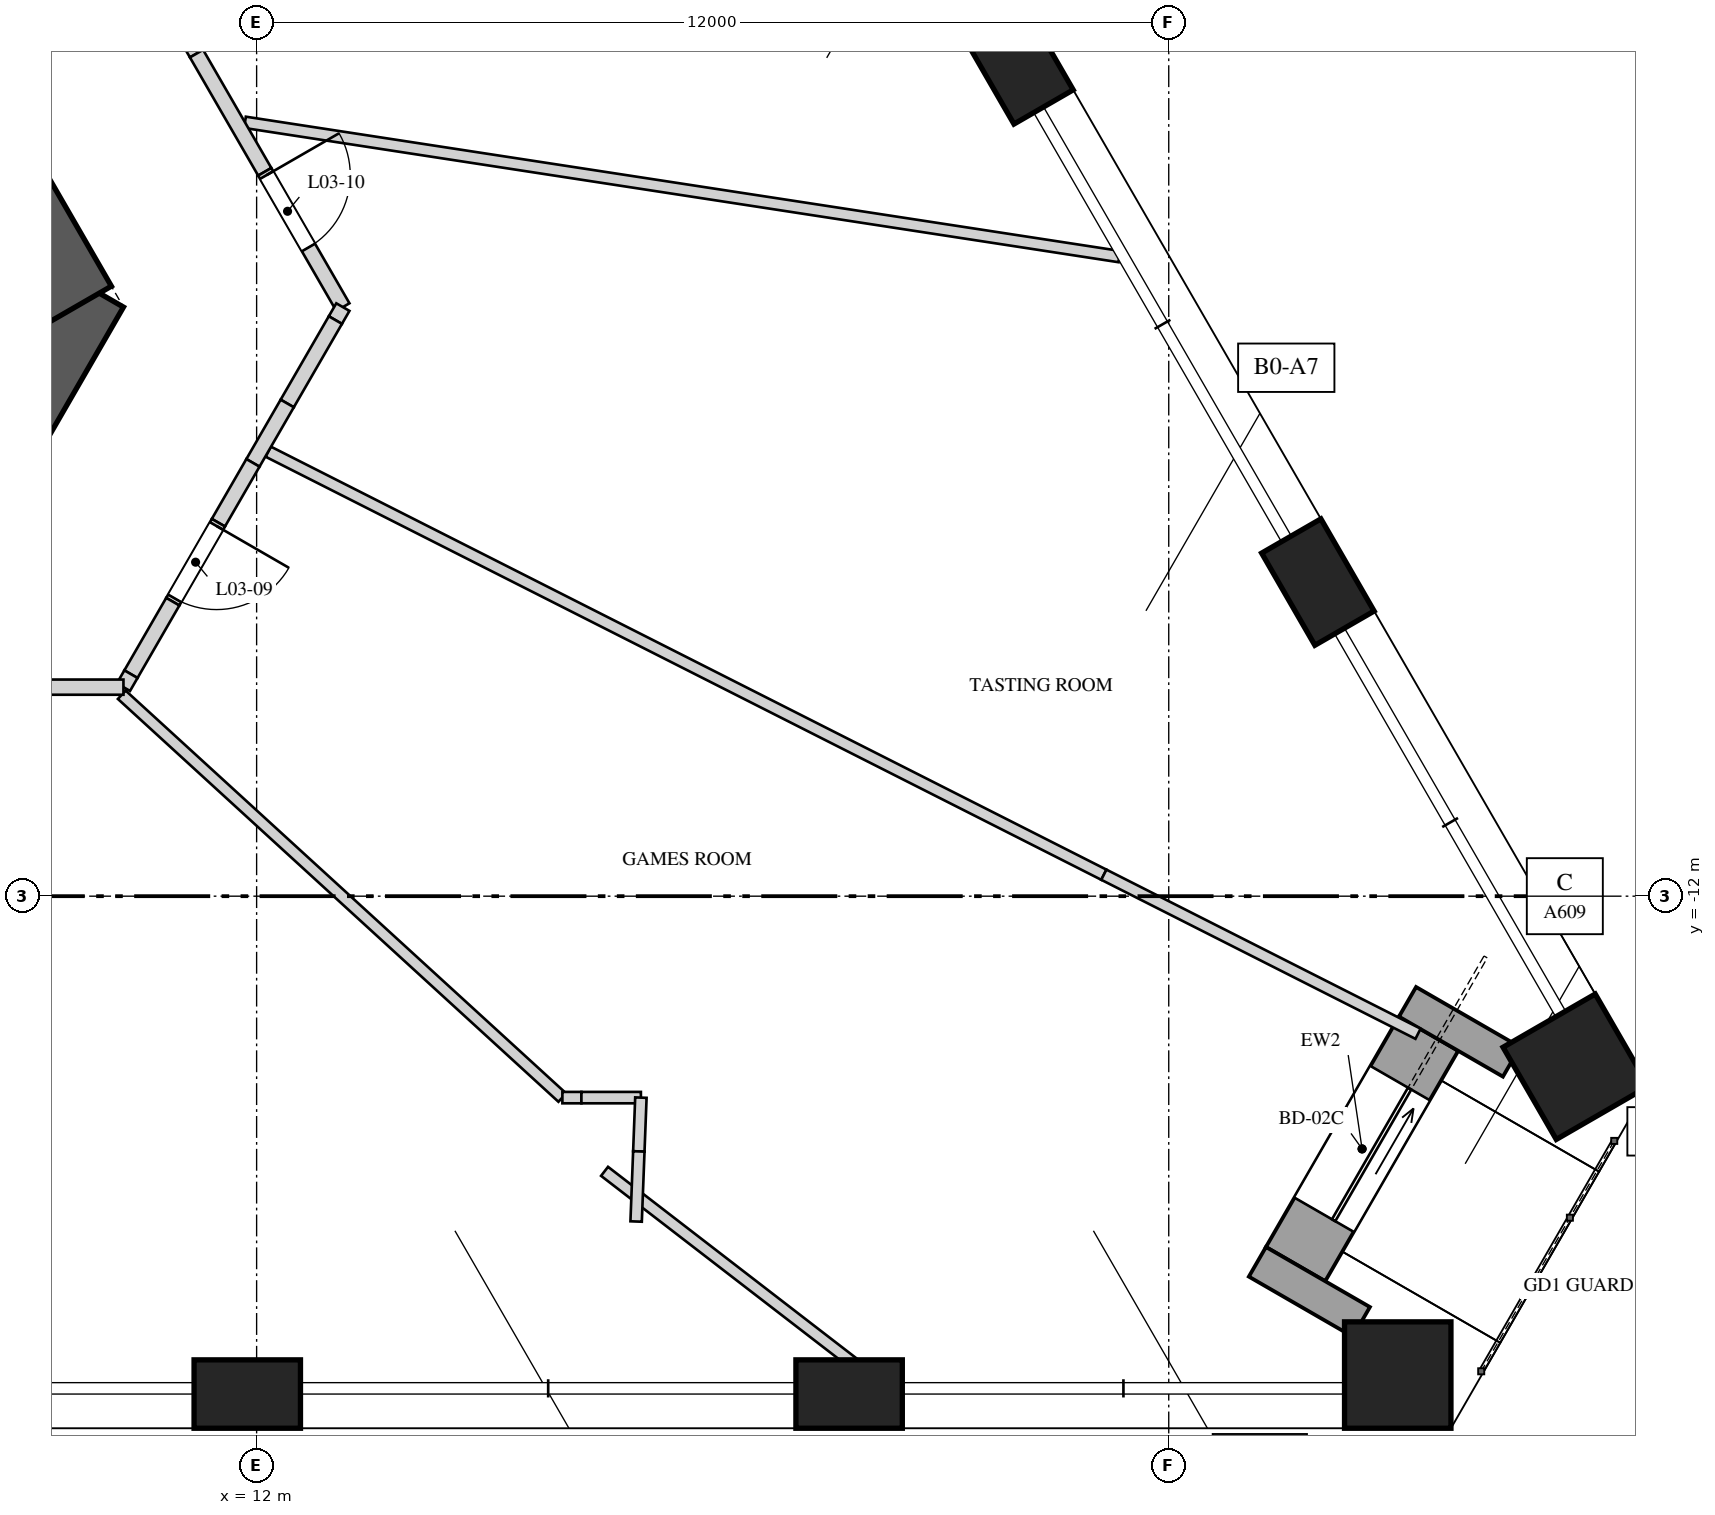
"""IFC4 building model, lengths in metres.
Left out: names, types, materials, properties, quantities, classifications, styles, units other than length and angle.
Written with IfcOpenShell. Run it as: python <this file> out.ifc"""

import sys

from ifc_helpers import new_model, si_unit, direction, frame, frame_2d, origin, origin_2d, place, context, subcontext, project, spatial, polyline, rectangle, outline, extrude, element, fill, save


model = new_model("IFC4")
c1 = context("Model", 3, precision=1e-05, world=origin(), true_north=direction((0.0, 1.0)))
c2 = subcontext(c1, "Body", "Model", "MODEL_VIEW")
j1 = project(units=[si_unit("LENGTHUNIT", "METRE"), si_unit("PLANEANGLEUNIT", "RADIAN")], contexts=[c1])
p1 = place(None, origin())
s1 = spatial("IfcSite", under=j1, at=p1, CompositionType="ELEMENT")
p2 = place(p1, origin())
s2 = spatial("IfcBuilding", under=s1, at=p2, CompositionType="ELEMENT")
p3 = place(p2, frame((0.0, 0.0, 20.0)))
s3 = spatial("IfcBuildingStorey", under=s2, at=p3, CompositionType="ELEMENT", Elevation=20.0)
p4 = place(p3, frame((8.328, -6.475, 0.0), z_axis=(0.0, 0.0, 1.0), x_axis=(0.499995765644, 0.866027848477, 0.0)))
e1 = element("IfcWall", 1, at=p4, inside=s3, PredefinedType="SHEAR", context=c2, shape_type="SweptSolid", body=[
    extrude(rectangle(XDim=2.887, YDim=1.1, at=frame_2d((1.443, 0.0))), origin(), (0.0, 0.0, 1.0), 5.0),
])
p5 = place(p3, frame((9.613, -4.25, 0.0), z_axis=(0.0, 0.0, 1.0), x_axis=(-0.500001757713, 0.866024388966, 0.0)))
e2 = element("IfcWall", 2, at=p5, inside=s3, PredefinedType="SHEAR", context=c2, shape_type="SweptSolid", body=[
    extrude(rectangle(XDim=16.974, YDim=1.1, at=frame_2d((8.487, 0.0))), origin(), (0.0, 0.0, 1.0), 5.0),
])
p6 = place(p5, frame((6.762, 0.0, 0.0)))
e3 = element("IfcOpeningElement", 3, at=p6, cuts=e2, PredefinedType="OPENING", context=c2, shape_type="SweptSolid", body=[
    extrude(rectangle(XDim=1.0, YDim=2.4, at=frame_2d((0.5, 1.2))), frame((0.0, 0.56, 0.0), z_axis=(0.0, -1.0, 0.0), x_axis=(1.0, 0.0, 0.0)), (0.0, 0.0, 1.0), 1.12),
])
for number, where, z_axis, x_axis in (
    (4, (11.877, -18.55, 0.0), (0.0, 0.0, 1.0), (1.0, 0.0, 0.0)),
    (5, (19.795, -18.55, 0.0), (0.0, 0.0, 1.0), (1.0, 0.0, 0.0)),
):
    element("IfcColumn", number, at=place(p3, frame(where, z_axis=z_axis, x_axis=x_axis)), inside=s3, PredefinedType="COLUMN", context=c2, shape_type="SweptSolid", body=[
        extrude(rectangle(XDim=1.4, YDim=0.9, at=origin_2d()), origin(), (0.0, 0.0, 1.0), 5.0),
    ])
for number, where, z_axis, x_axis in (
    (6, (27.013, -18.3, 0.0), (0.0, 0.0, 1.0), (1.0, 0.0, 0.0)),
    (7, (29.355, -14.244, 0.0), (0.0, 0.0, 1.0), (-0.5, 0.866, 0.0)),
):
    element("IfcColumn", number, at=place(p3, frame(where, z_axis=z_axis, x_axis=x_axis)), inside=s3, PredefinedType="COLUMN", context=c2, shape_type="SweptSolid", body=[
        extrude(rectangle(XDim=1.4, YDim=1.4, at=origin_2d()), origin(), (0.0, 0.0, 1.0), 5.0),
    ])
for number, where, z_axis, x_axis in (
    (8, (25.962, -7.868, 0.0), (0.0, 0.0, 1.0), (-0.5, 0.866, 0.0)),
    (9, (22.003, -1.011, 0.0), (0.0, 0.0, 1.0), (-0.5, 0.866, 0.0)),
):
    element("IfcColumn", number, at=place(p3, frame(where, z_axis=z_axis, x_axis=x_axis)), inside=s3, PredefinedType="COLUMN", context=c2, shape_type="SweptSolid", body=[
        extrude(rectangle(XDim=1.4, YDim=0.9, at=origin_2d()), origin(), (0.0, 0.0, 1.0), 5.0),
    ])
p7 = place(p3, frame((27.419, -13.81, 0.0), z_axis=(0.0, 0.0, 1.0), x_axis=(-0.500010275428, -0.866019471182, 0.0)))
e10 = element("IfcWall", 10, at=p7, inside=s3, PredefinedType="SOLIDWALL", context=c2, shape_type="SweptSolid", body=[
    extrude(rectangle(XDim=3.5, YDim=0.9, at=frame_2d((1.75, 0.0))), origin(), (0.0, 0.0, 1.0), 4.3),
])
p8 = place(p7, frame((0.75, 0.0, 0.0)))
e11 = element("IfcOpeningElement", 11, at=p8, cuts=e10, PredefinedType="OPENING", context=c2, shape_type="SweptSolid", body=[
    extrude(rectangle(XDim=2.0, YDim=2.4, at=frame_2d((1.0, 1.2))), frame((0.0, 0.46, 0.0), z_axis=(0.0, -1.0, 0.0), x_axis=(1.0, 0.0, 0.0)), (0.0, 0.0, 1.0), 0.92),
])
p9 = place(p3, frame((28.509, -14.179, 0.0), z_axis=(0.0, 0.0, 1.0), x_axis=(-0.866046570609, 0.499963336192, 0.0)))
e12 = element("IfcWall", 12, at=p9, inside=s3, PredefinedType="SOLIDWALL", context=c2, shape_type="SweptSolid", body=[
    extrude(rectangle(XDim=1.579, YDim=0.45, at=frame_2d((0.79, 0.0))), origin(), (0.0, 0.0, 1.0), 2.55),
])
p10 = place(p3, frame((26.534, -17.6, 0.0), z_axis=(0.0, 0.0, 1.0), x_axis=(-0.86597962928, 0.500079275387, 0.0)))
e13 = element("IfcWall", 13, at=p10, inside=s3, PredefinedType="SOLIDWALL", context=c2, shape_type="SweptSolid", body=[
    extrude(rectangle(XDim=1.579, YDim=0.45, at=frame_2d((0.79, 0.0))), origin(), (0.0, 0.0, 1.0), 2.55),
])
p11 = place(p3, frame((10.226, -9.35, 0.0), z_axis=(0.0, 0.0, 1.0), x_axis=(0.738001386372, -0.674799195104, 0.0)))
e14 = element("IfcWall", 14, at=p11, inside=s3, PredefinedType="PARTITIONING", context=c2, shape_type="SweptSolid", body=[
    extrude(rectangle(XDim=7.853, YDim=0.15, at=frame_2d((3.927, 0.0))), origin(), (0.0, 0.0, 1.0), 3.55),
])
p12 = place(p3, frame((11.847, -1.819, 0.0), z_axis=(0.0, 0.0, 1.0), x_axis=(0.988414820691, -0.151776619539, 0.0)))
e15 = element("IfcWall", 15, at=p12, inside=s3, PredefinedType="PARTITIONING", context=c2, shape_type="SweptSolid", body=[
    extrude(rectangle(XDim=11.639, YDim=0.15, at=frame_2d((5.82, 0.0))), origin(), (0.0, 0.0, 1.0), 4.65),
])
p13 = place(p3, frame((12.152, -6.152, 0.0), z_axis=(0.0, 0.0, 1.0), x_axis=(0.892189195248, -0.451661864542, 0.0)))
e16 = element("IfcWall", 16, at=p13, inside=s3, PredefinedType="PARTITIONING", context=c2, shape_type="SweptSolid", body=[
    extrude(rectangle(XDim=12.323, YDim=0.15, at=frame_2d((6.161, 0.0))), origin(), (0.0, 0.0, 1.0), 3.55),
])
p14 = place(p3, frame((23.146, -11.718, 0.0), z_axis=(0.0, 0.0, 1.0), x_axis=(0.892192371096, -0.451655591085, 0.0)))
e17 = element("IfcWall", 17, at=p14, inside=s3, PredefinedType="PARTITIONING", context=c2, shape_type="SweptSolid", body=[
    extrude(rectangle(XDim=4.633, YDim=0.15, at=frame_2d((2.316, 0.0))), origin(), (0.0, 0.0, 1.0), 4.65),
])
p15 = place(p3, frame((16.023, -14.65, 0.0), z_axis=(0.0, 0.0, 1.0), x_axis=(1.0, 0.0, 0.0)))
e18 = element("IfcWall", 18, at=p15, inside=s3, PredefinedType="PARTITIONING", context=c2, shape_type="SweptSolid", body=[
    extrude(rectangle(XDim=0.25, YDim=0.15, at=frame_2d((0.125, 0.0))), origin(), (0.0, 0.0, 1.0), 3.55),
])
p16 = place(p3, frame((16.273, -14.65, 0.0), z_axis=(0.0, 0.0, 1.0), x_axis=(1.0, 0.0, 0.0)))
e19 = element("IfcWall", 19, at=p16, inside=s3, PredefinedType="PARTITIONING", context=c2, shape_type="SweptSolid", body=[
    extrude(rectangle(XDim=0.782, YDim=0.15, at=frame_2d((0.391, 0.0))), origin(), (0.0, 0.0, 1.0), 4.65),
])
p17 = place(p3, frame((16.577, -15.62, 0.0), z_axis=(0.0, 0.0, 1.0), x_axis=(0.79203798149, -0.610471814155, 0.0)))
e20 = element("IfcWall", 20, at=p17, inside=s3, PredefinedType="PARTITIONING", context=c2, shape_type="SweptSolid", body=[
    extrude(rectangle(XDim=4.603, YDim=0.15, at=frame_2d((2.301, 0.0))), origin(), (0.0, 0.0, 1.0), 3.55),
])
p18 = place(p3, frame((17.056, -14.65, 0.0), z_axis=(0.0, 0.0, 1.0), x_axis=(-0.038605211655, -0.999254540962, 0.0)))
e21 = element("IfcWall", 21, at=p18, inside=s3, PredefinedType="PARTITIONING", context=c2, shape_type="SweptSolid", body=[
    extrude(rectangle(XDim=0.708, YDim=0.15, at=frame_2d((0.354, 0.0))), origin(), (0.0, 0.0, 1.0), 4.65),
])
p19 = place(p3, frame((17.028, -15.358, 0.0), z_axis=(0.0, 0.0, 1.0), x_axis=(-0.038361998043, -0.999263907637, 0.0)))
e22 = element("IfcWall", 22, at=p19, inside=s3, PredefinedType="PARTITIONING", context=c2, shape_type="SweptSolid", body=[
    extrude(rectangle(XDim=0.923, YDim=0.15, at=frame_2d((0.461, 0.0))), origin(), (0.0, 0.0, 1.0), 3.55),
])
p20 = place(p3, frame((10.734, -0.093, 0.0), z_axis=(0.0, 0.0, 1.0), x_axis=(0.500174821557, -0.865924446982, 0.0)))
e23 = element("IfcWall", 23, at=p20, inside=s3, PredefinedType="SOLIDWALL", context=c2, shape_type="SweptSolid", body=[
    extrude(rectangle(XDim=0.95, YDim=0.2, at=frame_2d((0.475, 0.0))), origin(), (0.0, 0.0, 1.0), 3.75),
])
p21 = place(p3, frame((11.209, -0.915, 0.0), z_axis=(0.0, 0.0, 1.0), x_axis=(0.49994221372, -0.866058764138, 0.0)))
e24 = element("IfcWall", 24, at=p21, inside=s3, PredefinedType="SOLIDWALL", context=c2, shape_type="SweptSolid", body=[
    extrude(rectangle(XDim=1.795, YDim=0.2, at=frame_2d((0.897, 0.0))), origin(), (0.0, 0.0, 1.0), 4.65),
])
p22 = place(p3, frame((12.107, -2.47, 0.0), z_axis=(0.0, 0.0, 1.0), x_axis=(0.50004803122, -0.86599767117, 0.0)))
e25 = element("IfcWall", 25, at=p22, inside=s3, PredefinedType="SOLIDWALL", context=c2, shape_type="SweptSolid", body=[
    extrude(outline(polyline([(0.0, 0.0), (2.055, 0.0), (2.055, 3.55), (1.02, 3.55), (1.02, 4.65), (0.0, 4.65), (0.0, 0.0)])), frame((0.0, 0.1, 0.0), z_axis=(0.0, -1.0, 0.0), x_axis=(1.0, 0.0, 0.0)), (0.0, 0.0, 1.0), 0.2),
])
p23 = place(p22, frame((0.05, 0.0, 0.0)))
e26 = element("IfcOpeningElement", 26, at=p23, cuts=e25, PredefinedType="OPENING", context=c2, shape_type="SweptSolid", body=[
    extrude(rectangle(XDim=1.1, YDim=2.4, at=frame_2d((0.55, 1.2))), frame((0.0, 0.11, 0.0), z_axis=(0.0, -1.0, 0.0), x_axis=(1.0, 0.0, 0.0)), (0.0, 0.0, 1.0), 0.22),
])
p24 = place(p3, frame((13.135, -4.25, 0.0), z_axis=(0.0, 0.0, 1.0), x_axis=(-0.499865263774, -0.866103179807, 0.0)))
e27 = element("IfcWall", 27, at=p24, inside=s3, PredefinedType="SOLIDWALL", context=c2, shape_type="SweptSolid", body=[
    extrude(rectangle(XDim=0.197, YDim=0.2, at=frame_2d((0.099, 0.0))), origin(), (0.0, 0.0, 1.0), 3.55),
])
p25 = place(p3, frame((13.036, -4.421, 0.0), z_axis=(0.0, 0.0, 1.0), x_axis=(-0.500056058743, -0.865993035835, 0.0)))
e28 = element("IfcWall", 28, at=p25, inside=s3, PredefinedType="SOLIDWALL", context=c2, shape_type="SweptSolid", body=[
    extrude(rectangle(XDim=1.267, YDim=0.2, at=frame_2d((0.633, 0.0))), origin(), (0.0, 0.0, 1.0), 4.65),
])
p26 = place(p3, frame((12.403, -5.518, 0.0), z_axis=(0.0, 0.0, 1.0), x_axis=(-0.500097243556, -0.865969252911, 0.0)))
e29 = element("IfcWall", 29, at=p26, inside=s3, PredefinedType="SOLIDWALL", context=c2, shape_type="SweptSolid", body=[
    extrude(rectangle(XDim=0.902, YDim=0.2, at=frame_2d((0.451, 0.0))), origin(), (0.0, 0.0, 1.0), 3.55),
])
p27 = place(p3, frame((11.951, -6.299, 0.0), z_axis=(0.0, 0.0, 1.0), x_axis=(-0.499923988433, -0.866069284636, 0.0)))
e30 = element("IfcWall", 30, at=p27, inside=s3, PredefinedType="SOLIDWALL", context=c2, shape_type="SweptSolid", body=[
    extrude(rectangle(XDim=0.909, YDim=0.2, at=frame_2d((0.455, 0.0))), origin(), (0.0, 0.0, 1.0), 4.65),
])
p28 = place(p3, frame((11.497, -7.086, 0.0), z_axis=(0.0, 0.0, 1.0), x_axis=(-0.499969057507, -0.866043267704, 0.0)))
e31 = element("IfcWall", 31, at=p28, inside=s3, PredefinedType="SOLIDWALL", context=c2, shape_type="SweptSolid", body=[
    extrude(outline(polyline([(0.0, 0.0), (1.2, 0.0), (1.2, 4.65), (1.034, 4.65), (1.034, 3.55), (0.132, 3.55), (0.132, 4.65), (0.0, 4.65), (0.0, 0.0)])), frame((0.0, 0.1, 0.0), z_axis=(0.0, -1.0, 0.0), x_axis=(1.0, 0.0, 0.0)), (0.0, 0.0, 1.0), 0.2),
])
p29 = place(p28, frame((0.05, 0.0, 0.0)))
e32 = element("IfcOpeningElement", 32, at=p29, cuts=e31, PredefinedType="OPENING", context=c2, shape_type="SweptSolid", body=[
    extrude(rectangle(XDim=1.1, YDim=2.4, at=frame_2d((0.55, 1.2))), frame((0.0, 0.11, 0.0), z_axis=(0.0, -1.0, 0.0), x_axis=(1.0, 0.0, 0.0)), (0.0, 0.0, 1.0), 0.22),
])
p30 = place(p3, frame((10.897, -8.125, 0.0), z_axis=(0.0, 0.0, 1.0), x_axis=(-0.499978356969, -0.866037899034, 0.0)))
e33 = element("IfcWall", 33, at=p30, inside=s3, PredefinedType="SOLIDWALL", context=c2, shape_type="SweptSolid", body=[
    extrude(rectangle(XDim=1.101, YDim=0.2, at=frame_2d((0.551, 0.0))), origin(), (0.0, 0.0, 1.0), 4.65),
])
p31 = place(p3, frame((10.347, -9.079, 0.0), z_axis=(0.0, 0.0, 1.0), x_axis=(-0.499865263774, -0.866103179807, 0.0)))
e34 = element("IfcWall", 34, at=p31, inside=s3, PredefinedType="SOLIDWALL", context=c2, shape_type="SweptSolid", body=[
    extrude(rectangle(XDim=0.197, YDim=0.2, at=frame_2d((0.099, 0.0))), origin(), (0.0, 0.0, 1.0), 3.55),
])
p32 = place(p3, frame((10.248, -9.25, 0.0), z_axis=(0.0, 0.0, 1.0), x_axis=(-1.0, 0.0, 0.0)))
e35 = element("IfcWall", 35, at=p32, inside=s3, PredefinedType="SOLIDWALL", context=c2, shape_type="SweptSolid", body=[
    extrude(rectangle(XDim=1.035, YDim=0.2, at=frame_2d((0.518, 0.0))), origin(), (0.0, 0.0, 1.0), 3.55),
])
p33 = place(p8, origin())
e36 = element("IfcDoor", 36, at=p33, inside=s3, OperationType="SLIDING_TO_LEFT", PredefinedType="DOOR", context=c2, shape_type="SweptSolid", body=[
    extrude(rectangle(XDim=2.0, YDim=2.4, at=frame_2d((1.0, 1.2))), frame((0.0, 0.025, 0.0), z_axis=(0.0, -1.0, 0.0), x_axis=(1.0, 0.0, 0.0)), (0.0, 0.0, 1.0), 0.05),
])
fill(e11, e36)
p34 = place(p29, origin())
e37 = element("IfcDoor", 37, at=p34, inside=s3, OperationType="SINGLE_SWING_LEFT", PredefinedType="DOOR", context=c2, shape_type="SweptSolid", body=[
    extrude(rectangle(XDim=1.1, YDim=2.4, at=frame_2d((0.55, 1.2))), frame((0.0, 0.025, 0.0), z_axis=(0.0, -1.0, 0.0), x_axis=(1.0, 0.0, 0.0)), (0.0, 0.0, 1.0), 0.05),
])
fill(e32, e37)
p35 = place(p23, origin())
e38 = element("IfcDoor", 38, at=p35, inside=s3, OperationType="SINGLE_SWING_RIGHT", PredefinedType="DOOR", context=c2, shape_type="SweptSolid", body=[
    extrude(rectangle(XDim=1.1, YDim=2.4, at=frame_2d((0.55, 1.2))), frame((0.0, 0.025, 0.0), z_axis=(0.0, -1.0, 0.0), x_axis=(1.0, 0.0, 0.0)), (0.0, 0.0, 1.0), 0.05),
])
fill(e26, e38)
save(model, sys.argv[1])
